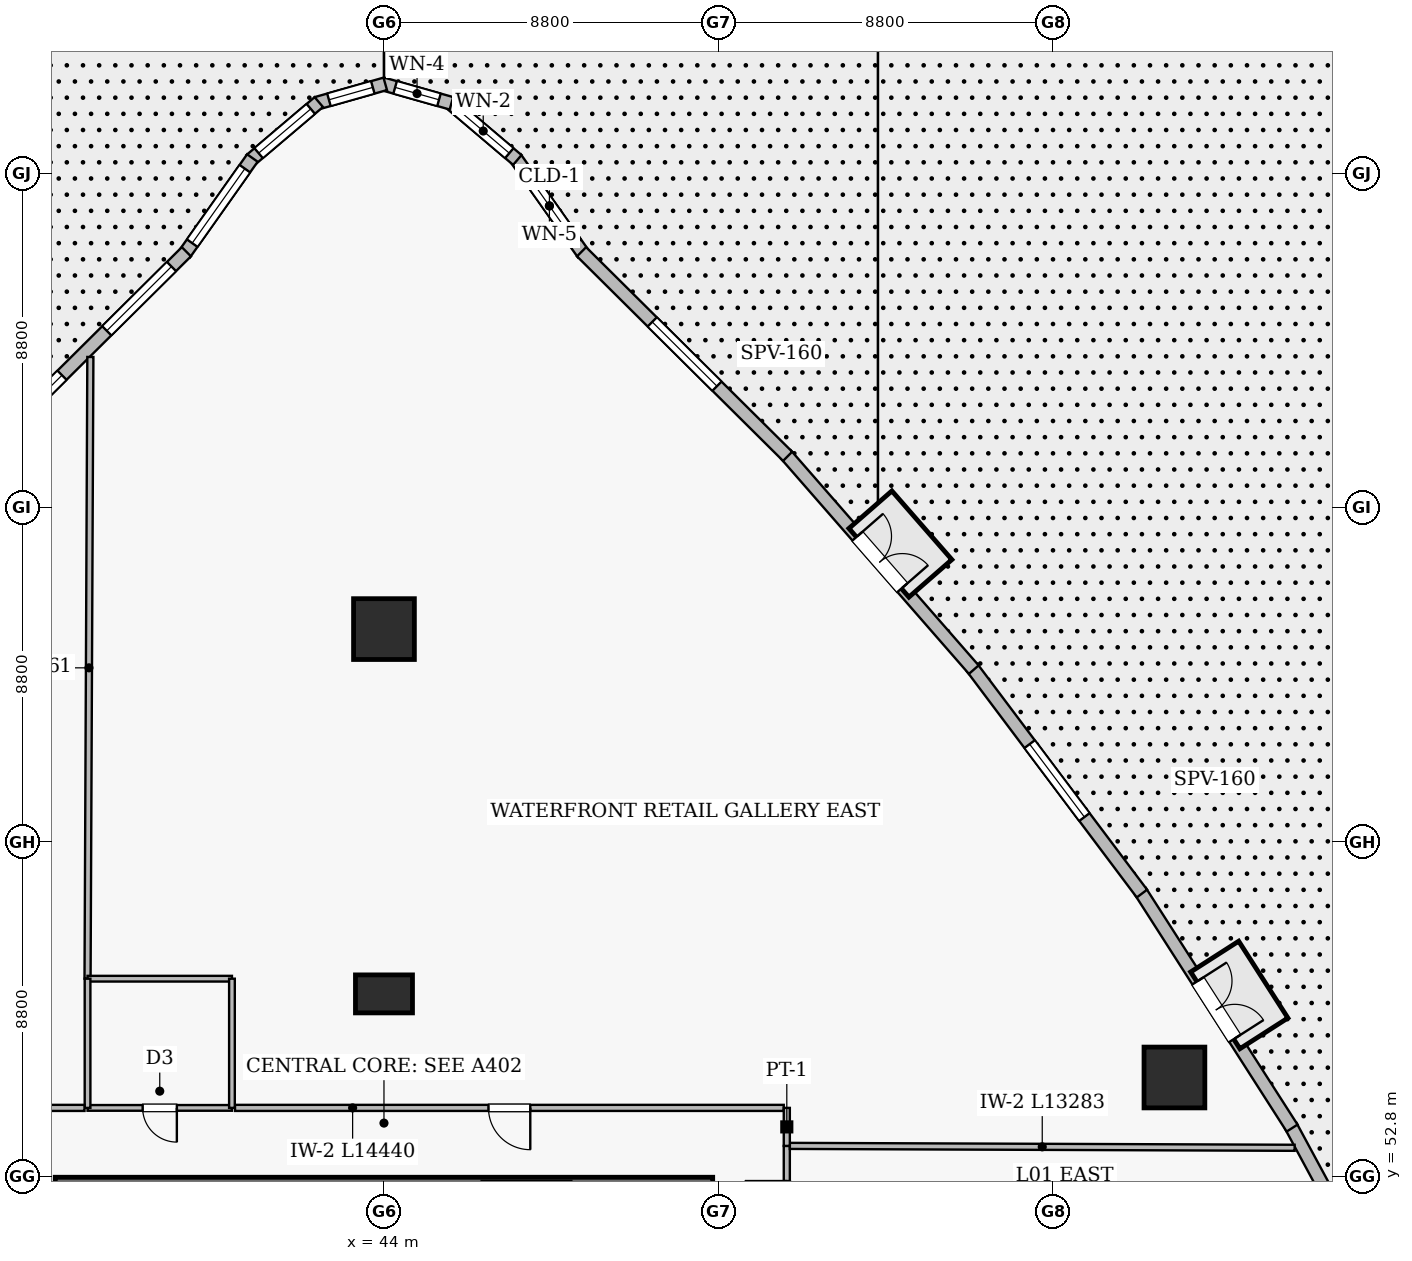
"""IFC4 building model, lengths in metres.
Left out: names, types, materials, properties, quantities, classifications, styles, units other than length and angle.
Written with IfcOpenShell. Run it as: python <this file> out.ifc"""

import sys

from ifc_helpers import new_model, si_unit, direction, frame, frame_2d, origin, origin_2d, place, context, subcontext, project, spatial, rectangle, extrude, element, fill, save


model = new_model("IFC4")
c1 = context("Model", 3, precision=1e-05, world=origin(), true_north=direction((0.0, 1.0)))
c2 = subcontext(c1, "Body", "Model", "MODEL_VIEW")
j1 = project(units=[si_unit("LENGTHUNIT", "METRE"), si_unit("PLANEANGLEUNIT", "RADIAN")], contexts=[c1])
p1 = place(None, origin())
s1 = spatial("IfcSite", under=j1, at=p1, CompositionType="ELEMENT")
p2 = place(p1, origin())
s2 = spatial("IfcBuilding", under=s1, at=p2, CompositionType="ELEMENT")
p3 = place(p2, origin())
s3 = spatial("IfcBuildingStorey", under=s2, at=p3, CompositionType="ELEMENT", Elevation=0.0)
p4 = place(p3, frame((35.35, 52.45, 0.0), z_axis=(0.0, 0.0, 1.0), x_axis=(1.0, 0.0, 0.0)))
e1 = element("IfcWall", 1, at=p4, inside=s3, PredefinedType="SHEAR", context=c2, shape_type="SweptSolid", body=[
    extrude(rectangle(XDim=17.3, YDim=0.65, at=frame_2d((8.65, 0.0))), origin(), (0.0, 0.0, 1.0), 4.5),
])
p5 = place(p3, frame((44.0, 57.6, 0.0), z_axis=(0.0, 0.0, 1.0), x_axis=(1.0, 0.0, 0.0)))
e2 = element("IfcColumn", 2, at=p5, inside=s3, PredefinedType="COLUMN", context=c2, shape_type="SweptSolid", body=[
    extrude(rectangle(XDim=1.5, YDim=1.0, at=origin_2d()), origin(), (0.0, 0.0, 1.0), 4.8),
])
for number, where, z_axis, x_axis in (
    (3, (44.0, 67.2, 0.0), (0.0, 0.0, 1.0), (1.0, 0.0, 0.0)),
    (4, (64.8, 55.4, 0.0), (0.0, 0.0, 1.0), (1.0, 0.0, 0.0)),
):
    element("IfcColumn", number, at=place(p3, frame(where, z_axis=z_axis, x_axis=x_axis)), inside=s3, PredefinedType="COLUMN", context=c2, shape_type="SweptSolid", body=[
        extrude(rectangle(XDim=1.6, YDim=1.6, at=origin_2d()), origin(), (0.0, 0.0, 1.0), 4.8),
    ])
p6 = place(p3, frame((49.244, 77.076, 0.0), z_axis=(0.0, 0.0, 1.0), x_axis=(-0.577273101635, 0.816551141159, 0.0)))
e5 = element("IfcWall", 5, at=p6, inside=s3, PredefinedType="SOLIDWALL", context=c2, shape_type="SweptSolid", body=[
    extrude(rectangle(XDim=3.086, YDim=0.34, at=frame_2d((1.543, 0.0))), origin(), (0.0, 0.0, 1.0), 4.5),
])
p7 = place(p6, frame((0.343, 0.0, 0.75)))
e6 = element("IfcOpeningElement", 6, at=p7, cuts=e5, PredefinedType="OPENING", context=c2, shape_type="SweptSolid", body=[
    extrude(rectangle(XDim=2.4, YDim=2.2, at=frame_2d((1.2, 1.1))), frame((0.0, 0.18, 0.0), z_axis=(0.0, -1.0, 0.0), x_axis=(1.0, 0.0, 0.0)), (0.0, 0.0, 1.0), 0.36),
])
p8 = place(p3, frame((47.509, 79.545, 0.0), z_axis=(0.0, 0.0, 1.0), x_axis=(-0.762417649303, 0.647085255612, 0.0)))
e7 = element("IfcWall", 7, at=p8, inside=s3, PredefinedType="SOLIDWALL", context=c2, shape_type="SweptSolid", body=[
    extrude(rectangle(XDim=2.354, YDim=0.34, at=frame_2d((1.177, 0.0))), origin(), (0.0, 0.0, 1.0), 4.5),
])
p9 = place(p8, frame((0.277, 0.0, 0.8)))
e8 = element("IfcOpeningElement", 8, at=p9, cuts=e7, PredefinedType="OPENING", context=c2, shape_type="SweptSolid", body=[
    extrude(rectangle(XDim=1.8, YDim=1.65, at=frame_2d((0.9, 0.825))), frame((0.0, 0.18, 0.0), z_axis=(0.0, -1.0, 0.0), x_axis=(1.0, 0.0, 0.0)), (0.0, 0.0, 1.0), 0.36),
])
p10 = place(p3, frame((45.775, 81.036, 0.0), z_axis=(0.0, 0.0, 1.0), x_axis=(-0.962226592622, 0.27224985666, 0.0)))
e9 = element("IfcWall", 9, at=p10, inside=s3, PredefinedType="SOLIDWALL", context=c2, shape_type="SweptSolid", body=[
    extrude(rectangle(XDim=1.88, YDim=0.34, at=frame_2d((0.94, 0.0))), origin(), (0.0, 0.0, 1.0), 4.5),
])
p11 = place(p10, frame((0.34, 0.0, 0.78)))
e10 = element("IfcOpeningElement", 10, at=p11, cuts=e9, PredefinedType="OPENING", context=c2, shape_type="SweptSolid", body=[
    extrude(rectangle(XDim=1.2, YDim=1.55, at=frame_2d((0.6, 0.775))), frame((0.0, 0.18, 0.0), z_axis=(0.0, -1.0, 0.0), x_axis=(1.0, 0.0, 0.0)), (0.0, 0.0, 1.0), 0.36),
])
p12 = place(p3, frame((44.034, 81.548, 0.0), z_axis=(0.0, 0.0, 1.0), x_axis=(-0.962226592622, -0.27224985666, 0.0)))
e11 = element("IfcWall", 11, at=p12, inside=s3, PredefinedType="SOLIDWALL", context=c2, shape_type="SweptSolid", body=[
    extrude(rectangle(XDim=1.88, YDim=0.34, at=frame_2d((0.94, 0.0))), origin(), (0.0, 0.0, 1.0), 4.5),
])
p13 = place(p12, frame((0.34, 0.0, 0.78)))
e12 = element("IfcOpeningElement", 12, at=p13, cuts=e11, PredefinedType="OPENING", context=c2, shape_type="SweptSolid", body=[
    extrude(rectangle(XDim=1.2, YDim=1.55, at=frame_2d((0.6, 0.775))), frame((0.0, 0.18, 0.0), z_axis=(0.0, -1.0, 0.0), x_axis=(1.0, 0.0, 0.0)), (0.0, 0.0, 1.0), 0.36),
])
p14 = place(p3, frame((42.285, 81.069, 0.0), z_axis=(0.0, 0.0, 1.0), x_axis=(-0.762417649303, -0.647085255612, 0.0)))
e13 = element("IfcWall", 13, at=p14, inside=s3, PredefinedType="SOLIDWALL", context=c2, shape_type="SweptSolid", body=[
    extrude(rectangle(XDim=2.354, YDim=0.34, at=frame_2d((1.177, 0.0))), origin(), (0.0, 0.0, 1.0), 4.5),
])
p15 = place(p14, frame((0.277, 0.0, 0.8)))
e14 = element("IfcOpeningElement", 14, at=p15, cuts=e13, PredefinedType="OPENING", context=c2, shape_type="SweptSolid", body=[
    extrude(rectangle(XDim=1.8, YDim=1.65, at=frame_2d((0.9, 0.825))), frame((0.0, 0.18, 0.0), z_axis=(0.0, -1.0, 0.0), x_axis=(1.0, 0.0, 0.0)), (0.0, 0.0, 1.0), 0.36),
])
p16 = place(p3, frame((40.538, 79.597, 0.0), z_axis=(0.0, 0.0, 1.0), x_axis=(-0.577273101635, -0.816551141159, 0.0)))
e15 = element("IfcWall", 15, at=p16, inside=s3, PredefinedType="SOLIDWALL", context=c2, shape_type="SweptSolid", body=[
    extrude(rectangle(XDim=3.086, YDim=0.34, at=frame_2d((1.543, 0.0))), origin(), (0.0, 0.0, 1.0), 4.5),
])
p17 = place(p16, frame((0.343, 0.0, 0.75)))
e16 = element("IfcOpeningElement", 16, at=p17, cuts=e15, PredefinedType="OPENING", context=c2, shape_type="SweptSolid", body=[
    extrude(rectangle(XDim=2.4, YDim=2.2, at=frame_2d((1.2, 1.1))), frame((0.0, 0.18, 0.0), z_axis=(0.0, -1.0, 0.0), x_axis=(1.0, 0.0, 0.0)), (0.0, 0.0, 1.0), 0.36),
])
p18 = place(p3, frame((38.801, 77.13, 0.0), z_axis=(0.0, 0.0, 1.0), x_axis=(-0.709690172366, -0.704513917, 0.0)))
e17 = element("IfcWall", 17, at=p18, inside=s3, PredefinedType="SOLIDWALL", context=c2, shape_type="SweptSolid", body=[
    extrude(rectangle(XDim=7.641, YDim=0.34, at=frame_2d((3.82, 0.0))), origin(), (0.0, 0.0, 1.0), 4.5),
])
p19 = place(p18, frame((0.552, 0.0, 0.75)))
e18 = element("IfcOpeningElement", 18, at=p19, cuts=e17, PredefinedType="OPENING", context=c2, shape_type="SweptSolid", body=[
    extrude(rectangle(XDim=2.4, YDim=2.2, at=frame_2d((1.2, 1.1))), frame((0.0, 0.18, 0.0), z_axis=(0.0, -1.0, 0.0), x_axis=(1.0, 0.0, 0.0)), (0.0, 0.0, 1.0), 0.36),
])
p20 = place(p18, frame((4.612, 0.0, 0.75)))
e19 = element("IfcOpeningElement", 19, at=p20, cuts=e17, PredefinedType="OPENING", context=c2, shape_type="SweptSolid", body=[
    extrude(rectangle(XDim=2.4, YDim=2.2, at=frame_2d((1.2, 1.1))), frame((0.0, 0.18, 0.0), z_axis=(0.0, -1.0, 0.0), x_axis=(1.0, 0.0, 0.0)), (0.0, 0.0, 1.0), 0.36),
])
p21 = place(p3, frame((71.374, 47.619, 0.0), z_axis=(0.0, 0.0, 1.0), x_axis=(-0.474967489697, 0.880003343022, 0.0)))
e20 = element("IfcWall", 20, at=p21, inside=s3, PredefinedType="SOLIDWALL", context=c2, shape_type="SweptSolid", body=[
    extrude(rectangle(XDim=7.398, YDim=0.34, at=frame_2d((3.699, 0.0))), origin(), (0.0, 0.0, 1.0), 4.5),
])
p22 = place(p21, frame((0.664, 0.0, 0.0)))
e21 = element("IfcOpeningElement", 21, at=p22, cuts=e20, PredefinedType="OPENING", context=c2, shape_type="SweptSolid", body=[
    extrude(rectangle(XDim=1.8, YDim=2.25, at=frame_2d((0.9, 1.125))), frame((0.0, 0.18, 0.0), z_axis=(0.0, -1.0, 0.0), x_axis=(1.0, 0.0, 0.0)), (0.0, 0.0, 1.0), 0.36),
])
p23 = place(p3, frame((67.896, 54.069, 0.0), z_axis=(0.0, 0.0, 1.0), x_axis=(-0.539522772187, 0.841971007987, 0.0)))
e22 = element("IfcWall", 22, at=p23, inside=s3, PredefinedType="SOLIDWALL", context=c2, shape_type="SweptSolid", body=[
    extrude(rectangle(XDim=7.398, YDim=0.34, at=frame_2d((3.699, 0.0))), origin(), (0.0, 0.0, 1.0), 4.5),
])
p24 = place(p23, frame((2.799, 0.0, 0.0)))
e23 = element("IfcOpeningElement", 23, at=p24, cuts=e22, PredefinedType="OPENING", context=c2, shape_type="SweptSolid", body=[
    extrude(rectangle(XDim=1.8, YDim=2.25, at=frame_2d((0.9, 1.125))), frame((0.0, 0.18, 0.0), z_axis=(0.0, -1.0, 0.0), x_axis=(1.0, 0.0, 0.0)), (0.0, 0.0, 1.0), 0.36),
])
p25 = place(p3, frame((63.945, 60.24, 0.0), z_axis=(0.0, 0.0, 1.0), x_axis=(-0.600729657805, 0.799452236368, 0.0)))
e24 = element("IfcWall", 24, at=p25, inside=s3, PredefinedType="SOLIDWALL", context=c2, shape_type="SweptSolid", body=[
    extrude(rectangle(XDim=7.439, YDim=0.34, at=frame_2d((3.719, 0.0))), origin(), (0.0, 0.0, 1.0), 4.5),
])
p26 = place(p25, frame((2.519, 0.0, 0.75)))
e25 = element("IfcOpeningElement", 25, at=p26, cuts=e24, PredefinedType="OPENING", context=c2, shape_type="SweptSolid", body=[
    extrude(rectangle(XDim=2.4, YDim=2.2, at=frame_2d((1.2, 1.1))), frame((0.0, 0.18, 0.0), z_axis=(0.0, -1.0, 0.0), x_axis=(1.0, 0.0, 0.0)), (0.0, 0.0, 1.0), 0.36),
])
p27 = place(p3, frame((59.52, 66.133, 0.0), z_axis=(0.0, 0.0, 1.0), x_axis=(-0.657686013661, 0.753292179327, 0.0)))
e26 = element("IfcWall", 26, at=p27, inside=s3, PredefinedType="SOLIDWALL", context=c2, shape_type="SweptSolid", body=[
    extrude(rectangle(XDim=7.52, YDim=0.34, at=frame_2d((3.76, 0.0))), origin(), (0.0, 0.0, 1.0), 4.5),
])
p28 = place(p27, frame((2.86, 0.0, 0.0)))
e27 = element("IfcOpeningElement", 27, at=p28, cuts=e26, PredefinedType="OPENING", context=c2, shape_type="SweptSolid", body=[
    extrude(rectangle(XDim=1.8, YDim=2.25, at=frame_2d((0.9, 1.125))), frame((0.0, 0.18, 0.0), z_axis=(0.0, -1.0, 0.0), x_axis=(1.0, 0.0, 0.0)), (0.0, 0.0, 1.0), 0.36),
])
p29 = place(p3, frame((54.622, 71.747, 0.0), z_axis=(0.0, 0.0, 1.0), x_axis=(-0.709690172366, 0.704513917, 0.0)))
e28 = element("IfcWall", 28, at=p29, inside=s3, PredefinedType="SOLIDWALL", context=c2, shape_type="SweptSolid", body=[
    extrude(rectangle(XDim=7.641, YDim=0.34, at=frame_2d((3.82, 0.0))), origin(), (0.0, 0.0, 1.0), 4.5),
])
p30 = place(p29, frame((2.62, 0.0, 0.75)))
e29 = element("IfcOpeningElement", 29, at=p30, cuts=e28, PredefinedType="OPENING", context=c2, shape_type="SweptSolid", body=[
    extrude(rectangle(XDim=2.4, YDim=2.2, at=frame_2d((1.2, 1.1))), frame((0.0, 0.18, 0.0), z_axis=(0.0, -1.0, 0.0), x_axis=(1.0, 0.0, 0.0)), (0.0, 0.0, 1.0), 0.36),
])
p31 = place(p3, frame((54.52, 54.6, 0.0), z_axis=(0.0, 0.0, 1.0), x_axis=(-1.0, 0.0, 0.0)))
e30 = element("IfcWall", 30, at=p31, inside=s3, PredefinedType="SOLIDWALL", context=c2, shape_type="SweptSolid", body=[
    extrude(rectangle(XDim=14.44, YDim=0.16, at=frame_2d((7.22, 0.0))), origin(), (0.0, 0.0, 1.0), 3.9),
])
p32 = place(p31, frame((6.67, 0.0, 0.0)))
e31 = element("IfcOpeningElement", 31, at=p32, cuts=e30, PredefinedType="OPENING", context=c2, shape_type="SweptSolid", body=[
    extrude(rectangle(XDim=1.1, YDim=2.15, at=frame_2d((0.55, 1.075))), frame((0.0, 0.09, 0.0), z_axis=(0.0, -1.0, 0.0), x_axis=(1.0, 0.0, 0.0)), (0.0, 0.0, 1.0), 0.18),
])
p33 = place(p3, frame((40.0, 54.6, 0.0), z_axis=(0.0, 0.0, 1.0), x_axis=(-1.0, 0.0, 0.0)))
e32 = element("IfcWall", 32, at=p33, inside=s3, PredefinedType="PLUMBINGWALL", context=c2, shape_type="SweptSolid", body=[
    extrude(rectangle(XDim=3.8, YDim=0.15, at=frame_2d((1.9, 0.0))), origin(), (0.0, 0.0, 1.0), 3.9),
])
p34 = place(p33, frame((1.45, 0.0, 0.0)))
e33 = element("IfcOpeningElement", 33, at=p34, cuts=e32, PredefinedType="OPENING", context=c2, shape_type="SweptSolid", body=[
    extrude(rectangle(XDim=0.9, YDim=2.1, at=frame_2d((0.45, 1.05))), frame((0.0, 0.085, 0.0), z_axis=(0.0, -1.0, 0.0), x_axis=(1.0, 0.0, 0.0)), (0.0, 0.0, 1.0), 0.17),
])
p35 = place(p3, frame((54.6, 50.65, 0.0), z_axis=(0.0, 0.0, 1.0), x_axis=(0.0, 1.0, 0.0)))
e34 = element("IfcWall", 34, at=p35, inside=s3, PredefinedType="SOLIDWALL", context=c2, shape_type="SweptSolid", body=[
    extrude(rectangle(XDim=2.95, YDim=0.16, at=frame_2d((1.475, 0.0))), origin(), (0.0, 0.0, 1.0), 3.9),
])
p36 = place(p35, frame((0.925, 0.0, 0.0)))
e35 = element("IfcOpeningElement", 35, at=p36, cuts=e34, PredefinedType="OPENING", context=c2, shape_type="SweptSolid", body=[
    extrude(rectangle(XDim=1.1, YDim=2.15, at=frame_2d((0.55, 1.075))), frame((0.0, 0.09, 0.0), z_axis=(0.0, -1.0, 0.0), x_axis=(1.0, 0.0, 0.0)), (0.0, 0.0, 1.0), 0.18),
])
p37 = place(p3, frame((36.2, 58.0, 0.0), z_axis=(0.0, 0.0, 1.0), x_axis=(0.004521329597, 0.999989778737, 0.0)))
e36 = element("IfcWall", 36, at=p37, inside=s3, PredefinedType="SOLIDWALL", context=c2, shape_type="SweptSolid", body=[
    extrude(rectangle(XDim=16.361, YDim=0.16, at=frame_2d((8.181, 0.0))), origin(), (0.0, 0.0, 1.0), 3.788),
])
p38 = place(p3, frame((67.963, 53.55, 0.0), z_axis=(0.0, 0.0, 1.0), x_axis=(-0.99999290155, 0.003767870767, 0.0)))
e37 = element("IfcWall", 37, at=p38, inside=s3, PredefinedType="SOLIDWALL", context=c2, shape_type="SweptSolid", body=[
    extrude(rectangle(XDim=13.283, YDim=0.16, at=frame_2d((6.642, 0.0))), origin(), (0.0, 0.0, 1.0), 3.688),
])
p39 = place(p3, frame((40.0, 58.0, 0.0), z_axis=(0.0, 0.0, 1.0), x_axis=(-1.0, 0.0, 0.0)))
e38 = element("IfcWall", 38, at=p39, inside=s3, PredefinedType="PLUMBINGWALL", context=c2, shape_type="SweptSolid", body=[
    extrude(rectangle(XDim=3.8, YDim=0.15, at=frame_2d((1.9, 0.0))), origin(), (0.0, 0.0, 1.0), 4.5),
])
p40 = place(p3, frame((36.2, 58.0, 0.0), z_axis=(0.0, 0.0, 1.0), x_axis=(0.0, -1.0, 0.0)))
e39 = element("IfcWall", 39, at=p40, inside=s3, PredefinedType="PLUMBINGWALL", context=c2, shape_type="SweptSolid", body=[
    extrude(rectangle(XDim=3.4, YDim=0.15, at=frame_2d((1.7, 0.0))), origin(), (0.0, 0.0, 1.0), 4.5),
])
p41 = place(p3, frame((40.0, 54.6, 0.0), z_axis=(0.0, 0.0, 1.0), x_axis=(0.0, 1.0, 0.0)))
e40 = element("IfcWall", 40, at=p41, inside=s3, PredefinedType="PLUMBINGWALL", context=c2, shape_type="SweptSolid", body=[
    extrude(rectangle(XDim=3.4, YDim=0.15, at=frame_2d((1.7, 0.0))), origin(), (0.0, 0.0, 1.0), 3.9),
])
p42 = place(p3, frame((36.12, 54.6, 0.0), z_axis=(0.0, 0.0, 1.0), x_axis=(-1.0, 0.0, 0.0)))
e41 = element("IfcWall", 41, at=p42, inside=s3, PredefinedType="SOLIDWALL", context=c2, shape_type="SweptSolid", body=[
    extrude(rectangle(XDim=2.64, YDim=0.16, at=frame_2d((1.32, 0.0))), origin(), (0.0, 0.0, 1.0), 4.5),
])
p43 = place(p3, frame((54.6, 53.6, 0.0), z_axis=(0.0, 0.0, 1.0), x_axis=(0.0, 1.0, 0.0)))
e42 = element("IfcWall", 42, at=p43, inside=s3, PredefinedType="SOLIDWALL", context=c2, shape_type="SweptSolid", body=[
    extrude(rectangle(XDim=1.0, YDim=0.16, at=frame_2d((0.5, 0.0))), origin(), (0.0, 0.0, 1.0), 4.5),
])
p44 = place(p7, origin())
e43 = element("IfcWindow", 43, at=p44, inside=s3, PartitioningType="SINGLE_PANEL", PredefinedType="WINDOW", context=c2, shape_type="SweptSolid", body=[
    extrude(rectangle(XDim=2.4, YDim=2.2, at=frame_2d((1.2, 1.1))), frame((0.0, 0.03, 0.0), z_axis=(0.0, -1.0, 0.0), x_axis=(1.0, 0.0, 0.0)), (0.0, 0.0, 1.0), 0.06),
])
fill(e6, e43)
p45 = place(p9, origin())
e44 = element("IfcWindow", 44, at=p45, inside=s3, PartitioningType="SINGLE_PANEL", PredefinedType="WINDOW", context=c2, shape_type="SweptSolid", body=[
    extrude(rectangle(XDim=1.8, YDim=1.65, at=frame_2d((0.9, 0.825))), frame((0.0, 0.03, 0.0), z_axis=(0.0, -1.0, 0.0), x_axis=(1.0, 0.0, 0.0)), (0.0, 0.0, 1.0), 0.06),
])
fill(e8, e44)
p46 = place(p11, origin())
e45 = element("IfcWindow", 45, at=p46, inside=s3, PartitioningType="SINGLE_PANEL", PredefinedType="WINDOW", context=c2, shape_type="SweptSolid", body=[
    extrude(rectangle(XDim=1.2, YDim=1.55, at=frame_2d((0.6, 0.775))), frame((0.0, 0.03, 0.0), z_axis=(0.0, -1.0, 0.0), x_axis=(1.0, 0.0, 0.0)), (0.0, 0.0, 1.0), 0.06),
])
fill(e10, e45)
p47 = place(p13, origin())
e46 = element("IfcWindow", 46, at=p47, inside=s3, PartitioningType="SINGLE_PANEL", PredefinedType="WINDOW", context=c2, shape_type="SweptSolid", body=[
    extrude(rectangle(XDim=1.2, YDim=1.55, at=frame_2d((0.6, 0.775))), frame((0.0, 0.03, 0.0), z_axis=(0.0, -1.0, 0.0), x_axis=(1.0, 0.0, 0.0)), (0.0, 0.0, 1.0), 0.06),
])
fill(e12, e46)
p48 = place(p15, origin())
e47 = element("IfcWindow", 47, at=p48, inside=s3, PartitioningType="SINGLE_PANEL", PredefinedType="WINDOW", context=c2, shape_type="SweptSolid", body=[
    extrude(rectangle(XDim=1.8, YDim=1.65, at=frame_2d((0.9, 0.825))), frame((0.0, 0.03, 0.0), z_axis=(0.0, -1.0, 0.0), x_axis=(1.0, 0.0, 0.0)), (0.0, 0.0, 1.0), 0.06),
])
fill(e14, e47)
p49 = place(p17, origin())
e48 = element("IfcWindow", 48, at=p49, inside=s3, PartitioningType="SINGLE_PANEL", PredefinedType="WINDOW", context=c2, shape_type="SweptSolid", body=[
    extrude(rectangle(XDim=2.4, YDim=2.2, at=frame_2d((1.2, 1.1))), frame((0.0, 0.03, 0.0), z_axis=(0.0, -1.0, 0.0), x_axis=(1.0, 0.0, 0.0)), (0.0, 0.0, 1.0), 0.06),
])
fill(e16, e48)
p50 = place(p19, origin())
e49 = element("IfcWindow", 49, at=p50, inside=s3, PartitioningType="SINGLE_PANEL", PredefinedType="WINDOW", context=c2, shape_type="SweptSolid", body=[
    extrude(rectangle(XDim=2.4, YDim=2.2, at=frame_2d((1.2, 1.1))), frame((0.0, 0.03, 0.0), z_axis=(0.0, -1.0, 0.0), x_axis=(1.0, 0.0, 0.0)), (0.0, 0.0, 1.0), 0.06),
])
fill(e18, e49)
p51 = place(p20, origin())
e50 = element("IfcWindow", 50, at=p51, inside=s3, PartitioningType="SINGLE_PANEL", PredefinedType="WINDOW", context=c2, shape_type="SweptSolid", body=[
    extrude(rectangle(XDim=2.4, YDim=2.2, at=frame_2d((1.2, 1.1))), frame((0.0, 0.03, 0.0), z_axis=(0.0, -1.0, 0.0), x_axis=(1.0, 0.0, 0.0)), (0.0, 0.0, 1.0), 0.06),
])
fill(e19, e50)
p52 = place(p24, frame((1.8, 0.0, 0.0), z_axis=(0.0, 0.0, 1.0), x_axis=(-1.0, 0.0, 0.0)))
e51 = element("IfcDoor", 51, at=p52, inside=s3, OperationType="DOUBLE_DOOR_SINGLE_SWING", PredefinedType="DOOR", context=c2, shape_type="SweptSolid", body=[
    extrude(rectangle(XDim=1.8, YDim=2.25, at=frame_2d((0.9, 1.125))), frame((0.0, 0.025, 0.0), z_axis=(0.0, -1.0, 0.0), x_axis=(1.0, 0.0, 0.0)), (0.0, 0.0, 1.0), 0.05),
])
fill(e23, e51)
p53 = place(p26, origin())
e52 = element("IfcWindow", 52, at=p53, inside=s3, PartitioningType="SINGLE_PANEL", PredefinedType="WINDOW", context=c2, shape_type="SweptSolid", body=[
    extrude(rectangle(XDim=2.4, YDim=2.2, at=frame_2d((1.2, 1.1))), frame((0.0, 0.03, 0.0), z_axis=(0.0, -1.0, 0.0), x_axis=(1.0, 0.0, 0.0)), (0.0, 0.0, 1.0), 0.06),
])
fill(e25, e52)
p54 = place(p28, frame((1.8, 0.0, 0.0), z_axis=(0.0, 0.0, 1.0), x_axis=(-1.0, 0.0, 0.0)))
e53 = element("IfcDoor", 53, at=p54, inside=s3, OperationType="DOUBLE_DOOR_SINGLE_SWING", PredefinedType="DOOR", context=c2, shape_type="SweptSolid", body=[
    extrude(rectangle(XDim=1.8, YDim=2.25, at=frame_2d((0.9, 1.125))), frame((0.0, 0.025, 0.0), z_axis=(0.0, -1.0, 0.0), x_axis=(1.0, 0.0, 0.0)), (0.0, 0.0, 1.0), 0.05),
])
fill(e27, e53)
p55 = place(p30, origin())
e54 = element("IfcWindow", 54, at=p55, inside=s3, PartitioningType="SINGLE_PANEL", PredefinedType="WINDOW", context=c2, shape_type="SweptSolid", body=[
    extrude(rectangle(XDim=2.4, YDim=2.2, at=frame_2d((1.2, 1.1))), frame((0.0, 0.03, 0.0), z_axis=(0.0, -1.0, 0.0), x_axis=(1.0, 0.0, 0.0)), (0.0, 0.0, 1.0), 0.06),
])
fill(e29, e54)
p56 = place(p36, origin())
e55 = element("IfcDoor", 55, at=p56, inside=s3, OperationType="SINGLE_SWING_RIGHT", PredefinedType="DOOR", context=c2, shape_type="SweptSolid", body=[
    extrude(rectangle(XDim=1.1, YDim=2.15, at=frame_2d((0.55, 1.075))), frame((0.0, 0.025, 0.0), z_axis=(0.0, -1.0, 0.0), x_axis=(1.0, 0.0, 0.0)), (0.0, 0.0, 1.0), 0.05),
])
fill(e35, e55)
p57 = place(p34, origin())
e56 = element("IfcDoor", 56, at=p57, inside=s3, OperationType="SINGLE_SWING_LEFT", PredefinedType="DOOR", context=c2, shape_type="SweptSolid", body=[
    extrude(rectangle(XDim=0.9, YDim=2.1, at=frame_2d((0.45, 1.05))), frame((0.0, 0.025, 0.0), z_axis=(0.0, -1.0, 0.0), x_axis=(1.0, 0.0, 0.0)), (0.0, 0.0, 1.0), 0.05),
])
fill(e33, e56)
p58 = place(p32, origin())
e57 = element("IfcDoor", 57, at=p58, inside=s3, OperationType="SINGLE_SWING_LEFT", PredefinedType="DOOR", context=c2, shape_type="SweptSolid", body=[
    extrude(rectangle(XDim=1.1, YDim=2.15, at=frame_2d((0.55, 1.075))), frame((0.0, 0.025, 0.0), z_axis=(0.0, -1.0, 0.0), x_axis=(1.0, 0.0, 0.0)), (0.0, 0.0, 1.0), 0.05),
])
fill(e31, e57)
save(model, sys.argv[1])
